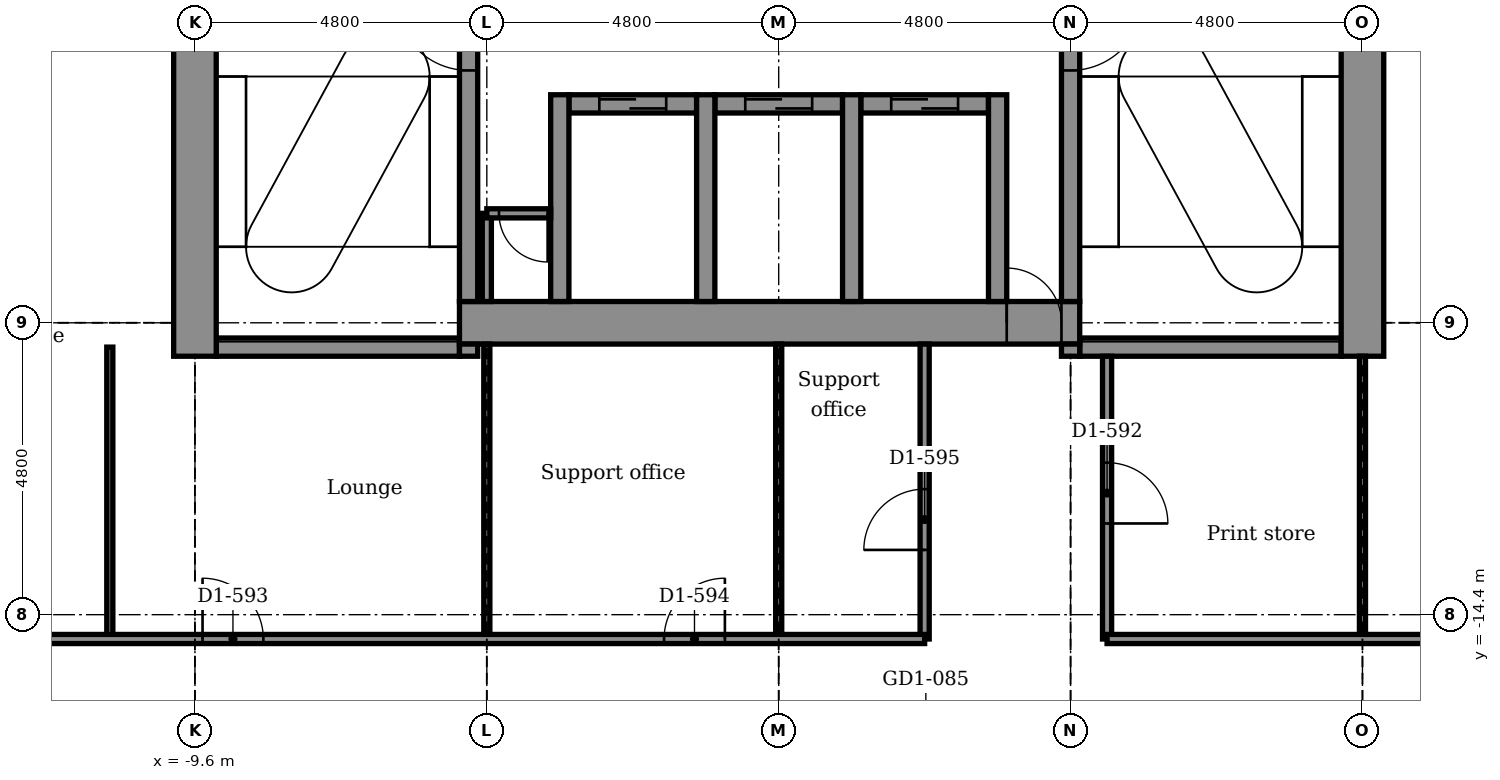
"""IFC4 building model, lengths in metres.
Left out: names, types, materials, properties, quantities, classifications, styles, units other than length and angle.
Written with IfcOpenShell. Run it as: python <this file> out.ifc"""

import sys

from ifc_helpers import new_model, si_unit, direction, frame, frame_2d, origin, place, context, subcontext, project, spatial, rectangle, extrude, element, fill, save


model = new_model("IFC4")
c1 = context("Model", 3, precision=1e-05, world=origin(), true_north=direction((0.0, 1.0)))
c2 = subcontext(c1, "Body", "Model", "MODEL_VIEW")
j1 = project(units=[si_unit("LENGTHUNIT", "METRE"), si_unit("PLANEANGLEUNIT", "RADIAN")], contexts=[c1])
p1 = place(None, origin())
s1 = spatial("IfcSite", under=j1, at=p1, CompositionType="ELEMENT")
p2 = place(p1, origin())
s2 = spatial("IfcBuilding", under=s1, at=p2, CompositionType="ELEMENT")
p3 = place(p2, frame((0.0, 0.0, 212.9)))
s3 = spatial("IfcBuildingStorey", under=s2, at=p3, CompositionType="ELEMENT", Elevation=212.9)
p4 = place(p3, frame((-9.25, -10.0, -0.15), z_axis=(0.0, 0.0, 1.0), x_axis=(1.0, 0.0, 0.0)))
e1 = element("IfcWall", 1, at=p4, inside=s3, PredefinedType="STANDARD", context=c2, shape_type="SweptSolid", body=[
    extrude(rectangle(XDim=4.0, YDim=0.3, at=frame_2d((2.0, 0.0))), origin(), (0.0, 0.0, 1.0), 3.75),
])
p5 = place(p3, frame((4.95, -10.0, -0.15), z_axis=(0.0, 0.0, 1.0), x_axis=(1.0, 0.0, 0.0)))
e2 = element("IfcWall", 2, at=p5, inside=s3, PredefinedType="STANDARD", context=c2, shape_type="SweptSolid", body=[
    extrude(rectangle(XDim=4.3, YDim=0.3, at=frame_2d((2.15, 0.0))), origin(), (0.0, 0.0, 1.0), 3.75),
])
p6 = place(p3, frame((-5.25, -9.6, -0.15), z_axis=(0.0, 0.0, 1.0), x_axis=(1.0, 0.0, 0.0)))
e3 = element("IfcWall", 3, at=p6, inside=s3, PredefinedType="SHEAR", context=c2, shape_type="SweptSolid", body=[
    extrude(rectangle(XDim=10.2, YDim=0.7, at=frame_2d((5.1, 0.0))), origin(), (0.0, 0.0, 1.0), 3.75),
])
p7 = place(p6, frame((9.0, 0.0, 0.15)))
e4 = element("IfcOpeningElement", 4, at=p7, cuts=e3, PredefinedType="OPENING", context=c2, shape_type="SweptSolid", body=[
    extrude(rectangle(XDim=0.9, YDim=2.1, at=frame_2d((0.45, 1.05))), frame((0.0, 0.36, 0.0), z_axis=(0.0, -1.0, 0.0), x_axis=(1.0, 0.0, 0.0)), (0.0, 0.0, 1.0), 0.72),
])
p8 = place(p3, frame((-3.45, -6.0, -0.15), z_axis=(0.0, 0.0, 1.0), x_axis=(1.0, 0.0, 0.0)))
e5 = element("IfcWall", 5, at=p8, inside=s3, PredefinedType="STANDARD", context=c2, shape_type="SweptSolid", body=[
    extrude(rectangle(XDim=2.1, YDim=0.3, at=frame_2d((1.05, 0.0))), origin(), (0.0, 0.0, 1.0), 3.75),
])
p9 = place(p8, frame((0.5, 0.0, 0.15)))
e6 = element("IfcOpeningElement", 6, at=p9, cuts=e5, PredefinedType="OPENING", context=c2, shape_type="SweptSolid", body=[
    extrude(rectangle(XDim=1.1, YDim=2.1, at=frame_2d((0.55, 1.05))), frame((0.0, 0.16, 0.0), z_axis=(0.0, -1.0, 0.0), x_axis=(1.0, 0.0, 0.0)), (0.0, 0.0, 1.0), 0.32),
])
p10 = place(p3, frame((-1.05, -6.0, -0.15), z_axis=(0.0, 0.0, 1.0), x_axis=(1.0, 0.0, 0.0)))
e7 = element("IfcWall", 7, at=p10, inside=s3, PredefinedType="STANDARD", context=c2, shape_type="SweptSolid", body=[
    extrude(rectangle(XDim=2.1, YDim=0.3, at=frame_2d((1.05, 0.0))), origin(), (0.0, 0.0, 1.0), 3.75),
])
p11 = place(p10, frame((0.5, 0.0, 0.15)))
e8 = element("IfcOpeningElement", 8, at=p11, cuts=e7, PredefinedType="OPENING", context=c2, shape_type="SweptSolid", body=[
    extrude(rectangle(XDim=1.1, YDim=2.1, at=frame_2d((0.55, 1.05))), frame((0.0, 0.16, 0.0), z_axis=(0.0, -1.0, 0.0), x_axis=(1.0, 0.0, 0.0)), (0.0, 0.0, 1.0), 0.32),
])
p12 = place(p3, frame((1.35, -6.0, -0.15), z_axis=(0.0, 0.0, 1.0), x_axis=(1.0, 0.0, 0.0)))
e9 = element("IfcWall", 9, at=p12, inside=s3, PredefinedType="STANDARD", context=c2, shape_type="SweptSolid", body=[
    extrude(rectangle(XDim=2.1, YDim=0.3, at=frame_2d((1.05, 0.0))), origin(), (0.0, 0.0, 1.0), 3.75),
])
p13 = place(p12, frame((0.5, 0.0, 0.15)))
e10 = element("IfcOpeningElement", 10, at=p13, cuts=e9, PredefinedType="OPENING", context=c2, shape_type="SweptSolid", body=[
    extrude(rectangle(XDim=1.1, YDim=2.1, at=frame_2d((0.55, 1.05))), frame((0.0, 0.16, 0.0), z_axis=(0.0, -1.0, 0.0), x_axis=(1.0, 0.0, 0.0)), (0.0, 0.0, 1.0), 0.32),
])
p14 = place(p3, frame((-9.6, -10.15, -0.15), z_axis=(0.0, 0.0, 1.0), x_axis=(0.0, 1.0, 0.0)))
e11 = element("IfcWall", 11, at=p14, inside=s3, PredefinedType="SHEAR", context=c2, shape_type="SweptSolid", body=[
    extrude(rectangle(XDim=7.6, YDim=0.7, at=frame_2d((3.8, 0.0))), origin(), (0.0, 0.0, 1.0), 3.75),
])
p15 = place(p3, frame((-5.1, -10.15, -0.15), z_axis=(0.0, 0.0, 1.0), x_axis=(0.0, 1.0, 0.0)))
e12 = element("IfcWall", 12, at=p15, inside=s3, PredefinedType="STANDARD", context=c2, shape_type="SweptSolid", body=[
    extrude(rectangle(XDim=0.2, YDim=0.3, at=frame_2d((0.1, 0.0))), origin(), (0.0, 0.0, 1.0), 3.75),
])
p16 = place(p3, frame((-5.1, -9.25, -0.15), z_axis=(0.0, 0.0, 1.0), x_axis=(0.0, 1.0, 0.0)))
e13 = element("IfcWall", 13, at=p16, inside=s3, PredefinedType="STANDARD", context=c2, shape_type="SweptSolid", body=[
    extrude(rectangle(XDim=7.0, YDim=0.3, at=frame_2d((3.5, 0.0))), origin(), (0.0, 0.0, 1.0), 3.75),
])
p17 = place(p16, frame((3.8, 0.0, 0.15)))
e14 = element("IfcOpeningElement", 14, at=p17, cuts=e13, PredefinedType="OPENING", context=c2, shape_type="SweptSolid", body=[
    extrude(rectangle(XDim=1.2, YDim=2.1, at=frame_2d((0.6, 1.05))), frame((0.0, 0.16, 0.0), z_axis=(0.0, -1.0, 0.0), x_axis=(1.0, 0.0, 0.0)), (0.0, 0.0, 1.0), 0.32),
])
for number, where, z_axis, x_axis in (
    (15, (-3.6, -9.25, -0.15), (0.0, 0.0, 1.0), (0.0, 1.0, 0.0)),
    (16, (-1.2, -9.25, -0.15), (0.0, 0.0, 1.0), (0.0, 1.0, 0.0)),
    (17, (1.2, -9.25, -0.15), (0.0, 0.0, 1.0), (0.0, 1.0, 0.0)),
    (18, (3.6, -9.25, -0.15), (0.0, 0.0, 1.0), (0.0, 1.0, 0.0)),
):
    element("IfcWall", number, at=place(p3, frame(where, z_axis=z_axis, x_axis=x_axis)), inside=s3, PredefinedType="STANDARD", context=c2, shape_type="SweptSolid", body=[
        extrude(rectangle(XDim=3.4, YDim=0.3, at=frame_2d((1.7, 0.0))), origin(), (0.0, 0.0, 1.0), 3.75),
    ])
p18 = place(p3, frame((4.8, -10.15, -0.15), z_axis=(0.0, 0.0, 1.0), x_axis=(0.0, 1.0, 0.0)))
e19 = element("IfcWall", 19, at=p18, inside=s3, PredefinedType="STANDARD", context=c2, shape_type="SweptSolid", body=[
    extrude(rectangle(XDim=0.2, YDim=0.3, at=frame_2d((0.1, 0.0))), origin(), (0.0, 0.0, 1.0), 3.75),
])
p19 = place(p3, frame((4.8, -9.25, -0.15), z_axis=(0.0, 0.0, 1.0), x_axis=(0.0, 1.0, 0.0)))
e20 = element("IfcWall", 20, at=p19, inside=s3, PredefinedType="STANDARD", context=c2, shape_type="SweptSolid", body=[
    extrude(rectangle(XDim=7.0, YDim=0.3, at=frame_2d((3.5, 0.0))), origin(), (0.0, 0.0, 1.0), 3.75),
])
p20 = place(p19, frame((3.8, 0.0, 0.15)))
e21 = element("IfcOpeningElement", 21, at=p20, cuts=e20, PredefinedType="OPENING", context=c2, shape_type="SweptSolid", body=[
    extrude(rectangle(XDim=1.2, YDim=2.1, at=frame_2d((0.6, 1.05))), frame((0.0, 0.16, 0.0), z_axis=(0.0, -1.0, 0.0), x_axis=(1.0, 0.0, 0.0)), (0.0, 0.0, 1.0), 0.32),
])
p21 = place(p3, frame((9.6, -10.15, -0.15), z_axis=(0.0, 0.0, 1.0), x_axis=(0.0, 1.0, 0.0)))
e22 = element("IfcWall", 22, at=p21, inside=s3, PredefinedType="SHEAR", context=c2, shape_type="SweptSolid", body=[
    extrude(rectangle(XDim=20.1, YDim=0.7, at=frame_2d((10.05, 0.0))), origin(), (0.0, 0.0, 1.0), 3.75),
])
p22 = place(p3, frame((9.6, -14.8, 0.0), z_axis=(0.0, 0.0, 1.0), x_axis=(0.0, 1.0, 0.0)))
e23 = element("IfcWall", 23, at=p22, inside=s3, PredefinedType="PARTITIONING", context=c2, shape_type="SweptSolid", body=[
    extrude(rectangle(XDim=4.65, YDim=0.1, at=frame_2d((2.325, 0.0))), origin(), (0.0, 0.0, 1.0), 2.838),
])
p23 = place(p3, frame((5.4, -14.8, 0.0), z_axis=(0.0, 0.0, 1.0), x_axis=(0.0, 1.0, 0.0)))
e24 = element("IfcWall", 24, at=p23, inside=s3, PredefinedType="PARTITIONING", context=c2, shape_type="SweptSolid", body=[
    extrude(rectangle(XDim=4.65, YDim=0.15, at=frame_2d((2.325, 0.0))), origin(), (0.0, 0.0, 1.0), 3.6),
])
p24 = place(p23, frame((1.9, 0.0, 0.0)))
e25 = element("IfcOpeningElement", 25, at=p24, cuts=e24, PredefinedType="OPENING", context=c2, shape_type="SweptSolid", body=[
    extrude(rectangle(XDim=1.0, YDim=2.1, at=frame_2d((0.5, 1.05))), frame((0.0, 0.085, 0.0), z_axis=(0.0, -1.0, 0.0), x_axis=(1.0, 0.0, 0.0)), (0.0, 0.0, 1.0), 0.17),
])
p25 = place(p3, frame((2.4, -14.8, 0.0), z_axis=(0.0, 0.0, 1.0), x_axis=(0.0, 1.0, 0.0)))
e26 = element("IfcWall", 26, at=p25, inside=s3, PredefinedType="PARTITIONING", context=c2, shape_type="SweptSolid", body=[
    extrude(rectangle(XDim=4.85, YDim=0.15, at=frame_2d((2.425, 0.0))), origin(), (0.0, 0.0, 1.0), 3.6),
])
p26 = place(p25, frame((1.465, 0.0, 0.0)))
e27 = element("IfcOpeningElement", 27, at=p26, cuts=e26, PredefinedType="OPENING", context=c2, shape_type="SweptSolid", body=[
    extrude(rectangle(XDim=1.0, YDim=2.1, at=frame_2d((0.5, 1.05))), frame((0.0, 0.085, 0.0), z_axis=(0.0, -1.0, 0.0), x_axis=(1.0, 0.0, 0.0)), (0.0, 0.0, 1.0), 0.17),
])
for number, where, z_axis, x_axis in (
    (28, (0.0, -14.8, 0.0), (0.0, 0.0, 1.0), (0.0, 1.0, 0.0)),
    (29, (-4.8, -14.8, 0.0), (0.0, 0.0, 1.0), (0.0, 1.0, 0.0)),
):
    element("IfcWall", number, at=place(p3, frame(where, z_axis=z_axis, x_axis=x_axis)), inside=s3, PredefinedType="PARTITIONING", context=c2, shape_type="SweptSolid", body=[
        extrude(rectangle(XDim=4.85, YDim=0.1, at=frame_2d((2.425, 0.0))), origin(), (0.0, 0.0, 1.0), 2.838),
    ])
p27 = place(p3, frame((-4.8, -9.25, 0.0), z_axis=(0.0, 0.0, 1.0), x_axis=(0.0, 1.0, 0.0)))
e30 = element("IfcWall", 30, at=p27, inside=s3, PredefinedType="PARTITIONING", context=c2, shape_type="SweptSolid", body=[
    extrude(rectangle(XDim=1.45, YDim=0.15, at=frame_2d((0.725, 0.0))), origin(), (0.0, 0.0, 1.0), 3.6),
])
p28 = place(p3, frame((-11.0, -14.8, 0.0), z_axis=(0.0, 0.0, 1.0), x_axis=(0.0, 1.0, 0.0)))
e31 = element("IfcWall", 31, at=p28, inside=s3, PredefinedType="PARTITIONING", context=c2, shape_type="SweptSolid", body=[
    extrude(rectangle(XDim=4.8, YDim=0.1, at=frame_2d((2.4, 0.0))), origin(), (0.0, 0.0, 1.0), 3.6),
])
p29 = place(p3, frame((-16.905, -14.8, 0.0), z_axis=(0.0, 0.0, 1.0), x_axis=(1.0, 0.0, 0.0)))
e32 = element("IfcWall", 32, at=p29, inside=s3, PredefinedType="PARTITIONING", context=c2, shape_type="SweptSolid", body=[
    extrude(rectangle(XDim=19.305, YDim=0.15, at=frame_2d((9.653, 0.0))), origin(), (0.0, 0.0, 1.0), 3.6),
])
p30 = place(p29, frame((7.43, 0.0, 0.0)))
e33 = element("IfcOpeningElement", 33, at=p30, cuts=e32, PredefinedType="OPENING", context=c2, shape_type="SweptSolid", body=[
    extrude(rectangle(XDim=1.0, YDim=2.1, at=frame_2d((0.5, 1.05))), frame((0.0, 0.085, 0.0), z_axis=(0.0, -1.0, 0.0), x_axis=(1.0, 0.0, 0.0)), (0.0, 0.0, 1.0), 0.17),
])
p31 = place(p29, frame((15.02, 0.0, 0.0)))
e34 = element("IfcOpeningElement", 34, at=p31, cuts=e32, PredefinedType="OPENING", context=c2, shape_type="SweptSolid", body=[
    extrude(rectangle(XDim=1.0, YDim=2.1, at=frame_2d((0.5, 1.05))), frame((0.0, 0.085, 0.0), z_axis=(0.0, -1.0, 0.0), x_axis=(1.0, 0.0, 0.0)), (0.0, 0.0, 1.0), 0.17),
])
p32 = place(p3, frame((5.4, -14.8, 0.0), z_axis=(0.0, 0.0, 1.0), x_axis=(1.0, 0.0, 0.0)))
e35 = element("IfcWall", 35, at=p32, inside=s3, PredefinedType="PARTITIONING", context=c2, shape_type="SweptSolid", body=[
    extrude(rectangle(XDim=12.985, YDim=0.15, at=frame_2d((6.492, 0.0))), origin(), (0.0, 0.0, 1.0), 3.6),
])
p33 = place(p32, frame((10.42, 0.0, 0.0)))
e36 = element("IfcOpeningElement", 36, at=p33, cuts=e35, PredefinedType="OPENING", context=c2, shape_type="SweptSolid", body=[
    extrude(rectangle(XDim=1.8, YDim=2.1, at=frame_2d((0.9, 1.05))), frame((0.0, 0.085, 0.0), z_axis=(0.0, -1.0, 0.0), x_axis=(1.0, 0.0, 0.0)), (0.0, 0.0, 1.0), 0.17),
])
p34 = place(p3, frame((-4.8, -7.8, 0.0), z_axis=(0.0, 0.0, 1.0), x_axis=(1.0, 0.0, 0.0)))
e37 = element("IfcWall", 37, at=p34, inside=s3, PredefinedType="PARTITIONING", context=c2, shape_type="SweptSolid", body=[
    extrude(rectangle(XDim=1.05, YDim=0.15, at=frame_2d((0.525, 0.0))), origin(), (0.0, 0.0, 1.0), 3.6),
])
p35 = place(p34, frame((0.2, 0.0, 0.0)))
e38 = element("IfcOpeningElement", 38, at=p35, cuts=e37, PredefinedType="OPENING", context=c2, shape_type="SweptSolid", body=[
    extrude(rectangle(XDim=0.8, YDim=2.1, at=frame_2d((0.4, 1.05))), frame((0.0, 0.085, 0.0), z_axis=(0.0, -1.0, 0.0), x_axis=(1.0, 0.0, 0.0)), (0.0, 0.0, 1.0), 0.17),
])
p36 = place(p35, frame((0.8, 0.0, 0.0), z_axis=(0.0, 0.0, 1.0), x_axis=(-1.0, 0.0, 0.0)))
e39 = element("IfcDoor", 39, at=p36, inside=s3, OperationType="SINGLE_SWING_RIGHT", PredefinedType="DOOR", context=c2, shape_type="SweptSolid", body=[
    extrude(rectangle(XDim=0.8, YDim=2.1, at=frame_2d((0.4, 1.05))), frame((0.0, 0.025, 0.0), z_axis=(0.0, -1.0, 0.0), x_axis=(1.0, 0.0, 0.0)), (0.0, 0.0, 1.0), 0.05),
])
fill(e38, e39)
p37 = place(p24, frame((1.0, 0.0, 0.0), z_axis=(0.0, 0.0, 1.0), x_axis=(-1.0, 0.0, 0.0)))
e40 = element("IfcDoor", 40, at=p37, inside=s3, OperationType="SINGLE_SWING_LEFT", PredefinedType="DOOR", context=c2, shape_type="SweptSolid", body=[
    extrude(rectangle(XDim=1.0, YDim=2.1, at=frame_2d((0.5, 1.05))), frame((0.0, 0.025, 0.0), z_axis=(0.0, -1.0, 0.0), x_axis=(1.0, 0.0, 0.0)), (0.0, 0.0, 1.0), 0.05),
])
fill(e25, e40)
p38 = place(p30, origin())
e41 = element("IfcDoor", 41, at=p38, inside=s3, OperationType="SINGLE_SWING_LEFT", PredefinedType="DOOR", context=c2, shape_type="SweptSolid", body=[
    extrude(rectangle(XDim=1.0, YDim=2.1, at=frame_2d((0.5, 1.05))), frame((0.0, 0.025, 0.0), z_axis=(0.0, -1.0, 0.0), x_axis=(1.0, 0.0, 0.0)), (0.0, 0.0, 1.0), 0.05),
])
fill(e33, e41)
p39 = place(p31, origin())
e42 = element("IfcDoor", 42, at=p39, inside=s3, OperationType="SINGLE_SWING_RIGHT", PredefinedType="DOOR", context=c2, shape_type="SweptSolid", body=[
    extrude(rectangle(XDim=1.0, YDim=2.1, at=frame_2d((0.5, 1.05))), frame((0.0, 0.025, 0.0), z_axis=(0.0, -1.0, 0.0), x_axis=(1.0, 0.0, 0.0)), (0.0, 0.0, 1.0), 0.05),
])
fill(e34, e42)
p40 = place(p26, origin())
e43 = element("IfcDoor", 43, at=p40, inside=s3, OperationType="SINGLE_SWING_LEFT", PredefinedType="DOOR", context=c2, shape_type="SweptSolid", body=[
    extrude(rectangle(XDim=1.0, YDim=2.1, at=frame_2d((0.5, 1.05))), frame((0.0, 0.025, 0.0), z_axis=(0.0, -1.0, 0.0), x_axis=(1.0, 0.0, 0.0)), (0.0, 0.0, 1.0), 0.05),
])
fill(e27, e43)
p41 = place(p9, origin())
e44 = element("IfcDoor", 44, at=p41, inside=s3, OperationType="DOUBLE_DOOR_SLIDING", PredefinedType="DOOR", context=c2, shape_type="SweptSolid", body=[
    extrude(rectangle(XDim=1.1, YDim=2.1, at=frame_2d((0.55, 1.05))), frame((0.0, 0.025, 0.0), z_axis=(0.0, -1.0, 0.0), x_axis=(1.0, 0.0, 0.0)), (0.0, 0.0, 1.0), 0.05),
])
fill(e6, e44)
p42 = place(p11, origin())
e45 = element("IfcDoor", 45, at=p42, inside=s3, OperationType="DOUBLE_DOOR_SLIDING", PredefinedType="DOOR", context=c2, shape_type="SweptSolid", body=[
    extrude(rectangle(XDim=1.1, YDim=2.1, at=frame_2d((0.55, 1.05))), frame((0.0, 0.025, 0.0), z_axis=(0.0, -1.0, 0.0), x_axis=(1.0, 0.0, 0.0)), (0.0, 0.0, 1.0), 0.05),
])
fill(e8, e45)
p43 = place(p13, origin())
e46 = element("IfcDoor", 46, at=p43, inside=s3, OperationType="DOUBLE_DOOR_SLIDING", PredefinedType="DOOR", context=c2, shape_type="SweptSolid", body=[
    extrude(rectangle(XDim=1.1, YDim=2.1, at=frame_2d((0.55, 1.05))), frame((0.0, 0.025, 0.0), z_axis=(0.0, -1.0, 0.0), x_axis=(1.0, 0.0, 0.0)), (0.0, 0.0, 1.0), 0.05),
])
fill(e10, e46)
p44 = place(p17, origin())
e47 = element("IfcDoor", 47, at=p44, inside=s3, OperationType="SINGLE_SWING_RIGHT", PredefinedType="DOOR", context=c2, shape_type="SweptSolid", body=[
    extrude(rectangle(XDim=1.2, YDim=2.1, at=frame_2d((0.6, 1.05))), frame((0.0, 0.025, 0.0), z_axis=(0.0, -1.0, 0.0), x_axis=(1.0, 0.0, 0.0)), (0.0, 0.0, 1.0), 0.05),
])
fill(e14, e47)
p45 = place(p20, frame((1.2, 0.0, 0.0), z_axis=(0.0, 0.0, 1.0), x_axis=(-1.0, 0.0, 0.0)))
e48 = element("IfcDoor", 48, at=p45, inside=s3, OperationType="SINGLE_SWING_RIGHT", PredefinedType="DOOR", context=c2, shape_type="SweptSolid", body=[
    extrude(rectangle(XDim=1.2, YDim=2.1, at=frame_2d((0.6, 1.05))), frame((0.0, 0.025, 0.0), z_axis=(0.0, -1.0, 0.0), x_axis=(1.0, 0.0, 0.0)), (0.0, 0.0, 1.0), 0.05),
])
fill(e21, e48)
p46 = place(p7, origin())
e49 = element("IfcDoor", 49, at=p46, inside=s3, OperationType="SINGLE_SWING_LEFT", PredefinedType="DOOR", context=c2, shape_type="SweptSolid", body=[
    extrude(rectangle(XDim=0.9, YDim=2.1, at=frame_2d((0.45, 1.05))), frame((0.0, 0.025, 0.0), z_axis=(0.0, -1.0, 0.0), x_axis=(1.0, 0.0, 0.0)), (0.0, 0.0, 1.0), 0.05),
])
fill(e4, e49)
save(model, sys.argv[1])
